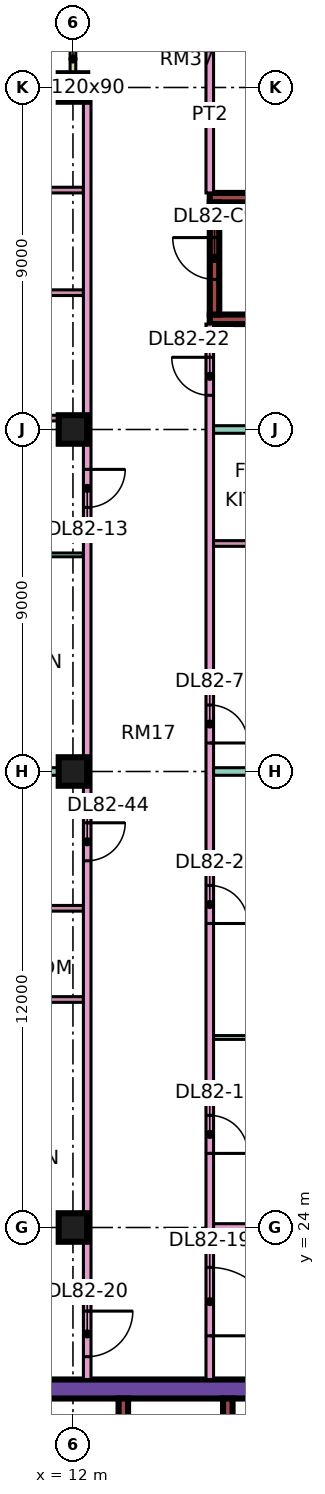
"""IFC4 building model, lengths in metres.
Left out: names, types, materials, properties, quantities, classifications, styles, units other than length and angle.
Written with IfcOpenShell. Run it as: python <this file> out.ifc"""

import sys

from ifc_helpers import new_model, si_unit, direction, frame, frame_2d, origin, origin_2d, place, context, subcontext, project, spatial, rectangle, extrude, element, fill, save


model = new_model("IFC4")
c1 = context("Model", 3, precision=1e-05, world=origin(), true_north=direction((0.0, 1.0)))
c2 = subcontext(c1, "Body", "Model", "MODEL_VIEW")
j1 = project(units=[si_unit("LENGTHUNIT", "METRE"), si_unit("PLANEANGLEUNIT", "RADIAN")], contexts=[c1])
p1 = place(None, origin())
s1 = spatial("IfcSite", under=j1, at=p1, CompositionType="ELEMENT")
p2 = place(p1, origin())
s2 = spatial("IfcBuilding", under=s1, at=p2, CompositionType="ELEMENT")
p3 = place(p2, frame((0.0, 0.0, 353.9)))
s3 = spatial("IfcBuildingStorey", under=s2, at=p3, CompositionType="ELEMENT", Elevation=353.9)
for number, where, z_axis, x_axis in (
    (1, (12.0, 24.0, 0.0), (0.0, 0.0, 1.0), (1.0, 0.0, 0.0)),
    (2, (12.0, 36.0, 0.0), (0.0, 0.0, 1.0), (1.0, 0.0, 0.0)),
    (3, (12.0, 45.0, 0.0), (0.0, 0.0, 1.0), (1.0, 0.0, 0.0)),
    (4, (12.0, 54.0, 0.0), (0.0, 0.0, 1.0), (1.0, 0.0, 0.0)),
):
    element("IfcColumn", number, at=place(p3, frame(where, z_axis=z_axis, x_axis=x_axis)), inside=s3, PredefinedType="COLUMN", context=c2, shape_type="SweptSolid", body=[
        extrude(rectangle(XDim=0.75, YDim=0.75, at=origin_2d()), origin(), (0.0, 0.0, 1.0), 3.75),
    ])
p4 = place(p3, frame((9.0, 19.75, 0.0), z_axis=(0.0, 0.0, 1.0), x_axis=(1.0, 0.0, 0.0)))
e5 = element("IfcWall", 5, at=p4, inside=s3, PredefinedType="SHEAR", context=c2, shape_type="SweptSolid", body=[
    extrude(rectangle(XDim=25.0, YDim=0.5, at=frame_2d((12.5, 0.0))), origin(), (0.0, 0.0, 1.0), 3.75),
])
p5 = place(p4, frame((19.1, 0.0, 0.0)))
e6 = element("IfcOpeningElement", 6, at=p5, cuts=e5, PredefinedType="OPENING", context=c2, shape_type="SweptSolid", body=[
    extrude(rectangle(XDim=1.8, YDim=2.4, at=frame_2d((0.9, 1.2))), frame((0.0, 0.26, 0.0), z_axis=(0.0, -1.0, 0.0), x_axis=(1.0, 0.0, 0.0)), (0.0, 0.0, 1.0), 0.52),
])
p6 = place(p3, frame((13.325, 7.5, 0.0), z_axis=(0.0, 0.0, 1.0), x_axis=(0.0, 1.0, 0.0)))
e7 = element("IfcWall", 7, at=p6, inside=s3, PredefinedType="SHEAR", context=c2, shape_type="SweptSolid", body=[
    extrude(rectangle(XDim=12.0, YDim=0.25, at=frame_2d((6.0, 0.0))), origin(), (0.0, 0.0, 1.0), 3.75),
])
p7 = place(p3, frame((16.075, 15.8, 0.0), z_axis=(0.0, 0.0, 1.0), x_axis=(0.0, 1.0, 0.0)))
e8 = element("IfcWall", 8, at=p7, inside=s3, PredefinedType="SHEAR", context=c2, shape_type="SweptSolid", body=[
    extrude(rectangle(XDim=3.7, YDim=0.25, at=frame_2d((1.85, 0.0))), origin(), (0.0, 0.0, 1.0), 3.75),
])
for number, where, z_axis, x_axis in (
    (9, (15.6, 47.9, 0.0), (0.0, 0.0, 1.0), (1.0, 0.0, 0.0)),
    (10, (15.6, 51.1, 0.0), (0.0, 0.0, 1.0), (1.0, 0.0, 0.0)),
):
    element("IfcWall", number, at=place(p3, frame(where, z_axis=z_axis, x_axis=x_axis)), inside=s3, PredefinedType="SHEAR", context=c2, shape_type="SweptSolid", body=[
        extrude(rectangle(XDim=7.0, YDim=0.25, at=frame_2d((3.5, 0.0))), origin(), (0.0, 0.0, 1.0), 3.75),
    ])
p8 = place(p3, frame((15.725, 48.025, 0.0), z_axis=(0.0, 0.0, 1.0), x_axis=(0.0, 1.0, 0.0)))
e11 = element("IfcWall", 11, at=p8, inside=s3, PredefinedType="SHEAR", context=c2, shape_type="SweptSolid", body=[
    extrude(rectangle(XDim=2.95, YDim=0.25, at=frame_2d((1.475, 0.0))), origin(), (0.0, 0.0, 1.0), 3.75),
])
p9 = place(p8, frame((0.925, 0.0, 0.0)))
e12 = element("IfcOpeningElement", 12, at=p9, cuts=e11, PredefinedType="OPENING", context=c2, shape_type="SweptSolid", body=[
    extrude(rectangle(XDim=1.1, YDim=2.2, at=frame_2d((0.55, 1.1))), frame((0.0, 0.135, 0.0), z_axis=(0.0, -1.0, 0.0), x_axis=(1.0, 0.0, 0.0)), (0.0, 0.0, 1.0), 0.27),
])
p10 = place(p3, frame((11.925, 54.0, 0.0), z_axis=(0.0, 0.0, 1.0), x_axis=(-1.0, 0.0, 0.0)))
e13 = element("IfcWall", 13, at=p10, inside=s3, PredefinedType="SOLIDWALL", context=c2, shape_type="SweptSolid", body=[
    extrude(rectangle(XDim=10.35, YDim=0.15, at=frame_2d((5.175, 0.0))), origin(), (0.0, 0.0, 1.0), 3.35),
])
p11 = place(p10, frame((2.075, 0.0, 1.7)))
e14 = element("IfcOpeningElement", 14, at=p11, cuts=e13, PredefinedType="OPENING", context=c2, shape_type="SweptSolid", body=[
    extrude(rectangle(XDim=1.2, YDim=0.9, at=frame_2d((0.6, 0.45))), frame((0.0, 0.085, 0.0), z_axis=(0.0, -1.0, 0.0), x_axis=(1.0, 0.0, 0.0)), (0.0, 0.0, 1.0), 0.17),
])
p12 = place(p10, frame((7.35, 0.0, 0.0)))
e15 = element("IfcOpeningElement", 15, at=p12, cuts=e13, PredefinedType="OPENING", context=c2, shape_type="SweptSolid", body=[
    extrude(rectangle(XDim=1.8, YDim=2.4, at=frame_2d((0.9, 1.2))), frame((0.0, 0.085, 0.0), z_axis=(0.0, -1.0, 0.0), x_axis=(1.0, 0.0, 0.0)), (0.0, 0.0, 1.0), 0.17),
])
p13 = place(p3, frame((12.0, 55.5, 0.0), z_axis=(0.0, 0.0, 1.0), x_axis=(0.0, -1.0, 0.0)))
e16 = element("IfcWall", 16, at=p13, inside=s3, PredefinedType="SOLIDWALL", context=c2, shape_type="SweptSolid", body=[
    extrude(rectangle(XDim=1.5, YDim=0.15, at=frame_2d((0.75, 0.0))), origin(), (0.0, 0.0, 1.0), 3.35),
])
p14 = place(p3, frame((-1.35, 22.4, 0.0), z_axis=(0.0, 0.0, 1.0), x_axis=(1.0, 0.0, 0.0)))
e17 = element("IfcWall", 17, at=p14, inside=s3, PredefinedType="PARTITIONING", context=c2, shape_type="SweptSolid", body=[
    extrude(rectangle(XDim=13.625, YDim=0.2, at=frame_2d((6.812, 0.0))), origin(), (0.0, 0.0, 1.0), 3.35),
])
p15 = place(p3, frame((0.0, 36.0, 0.0), z_axis=(0.0, 0.0, 1.0), x_axis=(1.0, 0.0, 0.0)))
e18 = element("IfcWall", 18, at=p15, inside=s3, PredefinedType="PARTITIONING", context=c2, shape_type="SweptSolid", body=[
    extrude(rectangle(XDim=12.275, YDim=0.2, at=frame_2d((6.137, 0.0))), origin(), (0.0, 0.0, 1.0), 3.35),
])
p16 = place(p3, frame((7.025, 41.7, 0.0), z_axis=(0.0, 0.0, 1.0), x_axis=(1.0, 0.0, 0.0)))
e19 = element("IfcWall", 19, at=p16, inside=s3, PredefinedType="PARTITIONING", context=c2, shape_type="SweptSolid", body=[
    extrude(rectangle(XDim=5.25, YDim=0.1, at=frame_2d((2.625, 0.0))), origin(), (0.0, 0.0, 1.0), 3.35),
])
p17 = place(p16, frame((2.2, 0.0, 0.0)))
e20 = element("IfcOpeningElement", 20, at=p17, cuts=e19, PredefinedType="OPENING", context=c2, shape_type="SweptSolid", body=[
    extrude(rectangle(XDim=0.9, YDim=2.1, at=frame_2d((0.45, 1.05))), frame((0.0, 0.06, 0.0), z_axis=(0.0, -1.0, 0.0), x_axis=(1.0, 0.0, 0.0)), (0.0, 0.0, 1.0), 0.12),
])
p18 = place(p3, frame((7.05, 45.3, 0.0), z_axis=(0.0, 0.0, 1.0), x_axis=(1.0, 0.0, 0.0)))
e21 = element("IfcWall", 21, at=p18, inside=s3, PredefinedType="PARTITIONING", context=c2, shape_type="SweptSolid", body=[
    extrude(rectangle(XDim=5.225, YDim=0.15, at=frame_2d((2.612, 0.0))), origin(), (0.0, 0.0, 1.0), 3.35),
])
p19 = place(p18, frame((2.275, 0.0, 0.0)))
e22 = element("IfcOpeningElement", 22, at=p19, cuts=e21, PredefinedType="OPENING", context=c2, shape_type="SweptSolid", body=[
    extrude(rectangle(XDim=0.8, YDim=2.1, at=frame_2d((0.4, 1.05))), frame((0.0, 0.085, 0.0), z_axis=(0.0, -1.0, 0.0), x_axis=(1.0, 0.0, 0.0)), (0.0, 0.0, 1.0), 0.17),
])
for number, where, z_axis, x_axis in (
    (23, (7.05, 48.6, 0.0), (0.0, 0.0, 1.0), (1.0, 0.0, 0.0)),
    (24, (7.05, 51.3, 0.0), (0.0, 0.0, 1.0), (1.0, 0.0, 0.0)),
):
    element("IfcWall", number, at=place(p3, frame(where, z_axis=z_axis, x_axis=x_axis)), inside=s3, PredefinedType="PARTITIONING", context=c2, shape_type="SweptSolid", body=[
        extrude(rectangle(XDim=5.225, YDim=0.15, at=frame_2d((2.612, 0.0))), origin(), (0.0, 0.0, 1.0), 3.35),
    ])
for number, where, z_axis, x_axis in (
    (25, (8.25, 30.0, 0.0), (0.0, 0.0, 1.0), (1.0, 0.0, 0.0)),
    (26, (8.25, 32.4, 0.0), (0.0, 0.0, 1.0), (1.0, 0.0, 0.0)),
):
    element("IfcWall", number, at=place(p3, frame(where, z_axis=z_axis, x_axis=x_axis)), inside=s3, PredefinedType="PARTITIONING", context=c2, shape_type="SweptSolid", body=[
        extrude(rectangle(XDim=4.025, YDim=0.15, at=frame_2d((2.012, 0.0))), origin(), (0.0, 0.0, 1.0), 3.35),
    ])
p20 = place(p3, frame((12.375, 20.0, 0.0), z_axis=(0.0, 0.0, 1.0), x_axis=(0.0, 1.0, 0.0)))
e27 = element("IfcWall", 27, at=p20, inside=s3, PredefinedType="PARTITIONING", context=c2, shape_type="SweptSolid", body=[
    extrude(rectangle(XDim=34.0, YDim=0.2, at=frame_2d((17.0, 0.0))), origin(), (0.0, 0.0, 1.0), 3.35),
])
p21 = place(p20, frame((22.95, 0.0, 0.0)))
e28 = element("IfcOpeningElement", 28, at=p21, cuts=e27, PredefinedType="OPENING", context=c2, shape_type="SweptSolid", body=[
    extrude(rectangle(XDim=1.0, YDim=2.1, at=frame_2d((0.5, 1.05))), frame((0.0, 0.11, 0.0), z_axis=(0.0, -1.0, 0.0), x_axis=(1.0, 0.0, 0.0)), (0.0, 0.0, 1.0), 0.22),
])
p22 = place(p20, frame((0.6, 0.0, 0.0)))
e29 = element("IfcOpeningElement", 29, at=p22, cuts=e27, PredefinedType="OPENING", context=c2, shape_type="SweptSolid", body=[
    extrude(rectangle(XDim=1.2, YDim=2.1, at=frame_2d((0.6, 1.05))), frame((0.0, 0.11, 0.0), z_axis=(0.0, -1.0, 0.0), x_axis=(1.0, 0.0, 0.0)), (0.0, 0.0, 1.0), 0.22),
])
p23 = place(p20, frame((13.65, 0.0, 0.0)))
e30 = element("IfcOpeningElement", 30, at=p23, cuts=e27, PredefinedType="OPENING", context=c2, shape_type="SweptSolid", body=[
    extrude(rectangle(XDim=1.0, YDim=2.1, at=frame_2d((0.5, 1.05))), frame((0.0, 0.11, 0.0), z_axis=(0.0, -1.0, 0.0), x_axis=(1.0, 0.0, 0.0)), (0.0, 0.0, 1.0), 0.22),
])
p24 = place(p3, frame((15.6, 20.0, 0.0), z_axis=(0.0, 0.0, 1.0), x_axis=(0.0, 1.0, 0.0)))
e31 = element("IfcWall", 31, at=p24, inside=s3, PredefinedType="PARTITIONING", context=c2, shape_type="SweptSolid", body=[
    extrude(rectangle(XDim=27.775, YDim=0.2, at=frame_2d((13.887, 0.0))), origin(), (0.0, 0.0, 1.0), 3.35),
])
p25 = place(p24, frame((5.95, 0.0, 0.0)))
e32 = element("IfcOpeningElement", 32, at=p25, cuts=e31, PredefinedType="OPENING", context=c2, shape_type="SweptSolid", body=[
    extrude(rectangle(XDim=1.0, YDim=2.1, at=frame_2d((0.5, 1.05))), frame((0.0, 0.11, 0.0), z_axis=(0.0, -1.0, 0.0), x_axis=(1.0, 0.0, 0.0)), (0.0, 0.0, 1.0), 0.22),
])
p26 = place(p24, frame((12.0, 0.0, 0.0)))
e33 = element("IfcOpeningElement", 33, at=p26, cuts=e31, PredefinedType="OPENING", context=c2, shape_type="SweptSolid", body=[
    extrude(rectangle(XDim=1.0, YDim=2.1, at=frame_2d((0.5, 1.05))), frame((0.0, 0.11, 0.0), z_axis=(0.0, -1.0, 0.0), x_axis=(1.0, 0.0, 0.0)), (0.0, 0.0, 1.0), 0.22),
])
p27 = place(p24, frame((16.75, 0.0, 0.0)))
e34 = element("IfcOpeningElement", 34, at=p27, cuts=e31, PredefinedType="OPENING", context=c2, shape_type="SweptSolid", body=[
    extrude(rectangle(XDim=1.0, YDim=2.1, at=frame_2d((0.5, 1.05))), frame((0.0, 0.11, 0.0), z_axis=(0.0, -1.0, 0.0), x_axis=(1.0, 0.0, 0.0)), (0.0, 0.0, 1.0), 0.22),
])
p28 = place(p24, frame((1.15, 0.0, 0.0)))
e35 = element("IfcOpeningElement", 35, at=p28, cuts=e31, PredefinedType="OPENING", context=c2, shape_type="SweptSolid", body=[
    extrude(rectangle(XDim=1.8, YDim=2.1, at=frame_2d((0.9, 1.05))), frame((0.0, 0.11, 0.0), z_axis=(0.0, -1.0, 0.0), x_axis=(1.0, 0.0, 0.0)), (0.0, 0.0, 1.0), 0.22),
])
p29 = place(p24, frame((25.9, 0.0, 0.0)))
e36 = element("IfcOpeningElement", 36, at=p29, cuts=e31, PredefinedType="OPENING", context=c2, shape_type="SweptSolid", body=[
    extrude(rectangle(XDim=1.0, YDim=2.1, at=frame_2d((0.5, 1.05))), frame((0.0, 0.11, 0.0), z_axis=(0.0, -1.0, 0.0), x_axis=(1.0, 0.0, 0.0)), (0.0, 0.0, 1.0), 0.22),
])
p30 = place(p3, frame((15.6, 51.225, 0.0), z_axis=(0.0, 0.0, 1.0), x_axis=(0.0, 1.0, 0.0)))
e37 = element("IfcWall", 37, at=p30, inside=s3, PredefinedType="PARTITIONING", context=c2, shape_type="SweptSolid", body=[
    extrude(rectangle(XDim=4.125, YDim=0.2, at=frame_2d((2.062, 0.0))), origin(), (0.0, 0.0, 1.0), 3.35),
])
p31 = place(p3, frame((15.7, 24.0, 0.0), z_axis=(0.0, 0.0, 1.0), x_axis=(1.0, 0.0, 0.0)))
e38 = element("IfcWall", 38, at=p31, inside=s3, PredefinedType="PARTITIONING", context=c2, shape_type="SweptSolid", body=[
    extrude(rectangle(XDim=5.8, YDim=0.2, at=frame_2d((2.9, 0.0))), origin(), (0.0, 0.0, 1.0), 3.35),
])
p32 = place(p3, frame((15.7, 29.0, 0.0), z_axis=(0.0, 0.0, 1.0), x_axis=(1.0, 0.0, 0.0)))
e39 = element("IfcWall", 39, at=p32, inside=s3, PredefinedType="PARTITIONING", context=c2, shape_type="SweptSolid", body=[
    extrude(rectangle(XDim=5.8, YDim=0.1, at=frame_2d((2.9, 0.0))), origin(), (0.0, 0.0, 1.0), 3.35),
])
p33 = place(p3, frame((15.7, 36.0, 0.0), z_axis=(0.0, 0.0, 1.0), x_axis=(1.0, 0.0, 0.0)))
e40 = element("IfcWall", 40, at=p33, inside=s3, PredefinedType="PARTITIONING", context=c2, shape_type="SweptSolid", body=[
    extrude(rectangle(XDim=8.3, YDim=0.2, at=frame_2d((4.15, 0.0))), origin(), (0.0, 0.0, 1.0), 3.35),
])
for number, where, z_axis, x_axis in (
    (41, (15.7, 38.4, 0.0), (0.0, 0.0, 1.0), (1.0, 0.0, 0.0)),
    (42, (15.7, 42.0, 0.0), (0.0, 0.0, 1.0), (1.0, 0.0, 0.0)),
):
    element("IfcWall", number, at=place(p3, frame(where, z_axis=z_axis, x_axis=x_axis)), inside=s3, PredefinedType="PARTITIONING", context=c2, shape_type="SweptSolid", body=[
        extrude(rectangle(XDim=2.825, YDim=0.15, at=frame_2d((1.413, 0.0))), origin(), (0.0, 0.0, 1.0), 3.35),
    ])
p34 = place(p3, frame((15.7, 45.0, 0.0), z_axis=(0.0, 0.0, 1.0), x_axis=(1.0, 0.0, 0.0)))
e43 = element("IfcWall", 43, at=p34, inside=s3, PredefinedType="PARTITIONING", context=c2, shape_type="SweptSolid", body=[
    extrude(rectangle(XDim=8.3, YDim=0.2, at=frame_2d((4.15, 0.0))), origin(), (0.0, 0.0, 1.0), 3.35),
])
p35 = place(p9, frame((1.1, 0.0, 0.0), z_axis=(0.0, 0.0, 1.0), x_axis=(-1.0, 0.0, 0.0)))
e44 = element("IfcDoor", 44, at=p35, inside=s3, OperationType="SINGLE_SWING_RIGHT", PredefinedType="DOOR", context=c2, shape_type="SweptSolid", body=[
    extrude(rectangle(XDim=1.1, YDim=2.2, at=frame_2d((0.55, 1.1))), frame((0.0, 0.025, 0.0), z_axis=(0.0, -1.0, 0.0), x_axis=(1.0, 0.0, 0.0)), (0.0, 0.0, 1.0), 0.05),
])
fill(e12, e44)
p36 = place(p25, frame((1.0, 0.0, 0.0), z_axis=(0.0, 0.0, 1.0), x_axis=(-1.0, 0.0, 0.0)))
e45 = element("IfcDoor", 45, at=p36, inside=s3, OperationType="SINGLE_SWING_LEFT", PredefinedType="DOOR", context=c2, shape_type="SweptSolid", body=[
    extrude(rectangle(XDim=1.0, YDim=2.1, at=frame_2d((0.5, 1.05))), frame((0.0, 0.025, 0.0), z_axis=(0.0, -1.0, 0.0), x_axis=(1.0, 0.0, 0.0)), (0.0, 0.0, 1.0), 0.05),
])
fill(e32, e45)
p37 = place(p26, frame((1.0, 0.0, 0.0), z_axis=(0.0, 0.0, 1.0), x_axis=(-1.0, 0.0, 0.0)))
e46 = element("IfcDoor", 46, at=p37, inside=s3, OperationType="SINGLE_SWING_LEFT", PredefinedType="DOOR", context=c2, shape_type="SweptSolid", body=[
    extrude(rectangle(XDim=1.0, YDim=2.1, at=frame_2d((0.5, 1.05))), frame((0.0, 0.025, 0.0), z_axis=(0.0, -1.0, 0.0), x_axis=(1.0, 0.0, 0.0)), (0.0, 0.0, 1.0), 0.05),
])
fill(e33, e46)
p38 = place(p27, frame((1.0, 0.0, 0.0), z_axis=(0.0, 0.0, 1.0), x_axis=(-1.0, 0.0, 0.0)))
e47 = element("IfcDoor", 47, at=p38, inside=s3, OperationType="SINGLE_SWING_LEFT", PredefinedType="DOOR", context=c2, shape_type="SweptSolid", body=[
    extrude(rectangle(XDim=1.0, YDim=2.1, at=frame_2d((0.5, 1.05))), frame((0.0, 0.025, 0.0), z_axis=(0.0, -1.0, 0.0), x_axis=(1.0, 0.0, 0.0)), (0.0, 0.0, 1.0), 0.05),
])
fill(e34, e47)
p39 = place(p21, origin())
e48 = element("IfcDoor", 48, at=p39, inside=s3, OperationType="SINGLE_SWING_RIGHT", PredefinedType="DOOR", context=c2, shape_type="SweptSolid", body=[
    extrude(rectangle(XDim=1.0, YDim=2.1, at=frame_2d((0.5, 1.05))), frame((0.0, 0.025, 0.0), z_axis=(0.0, -1.0, 0.0), x_axis=(1.0, 0.0, 0.0)), (0.0, 0.0, 1.0), 0.05),
])
fill(e28, e48)
p40 = place(p28, frame((1.8, 0.0, 0.0), z_axis=(0.0, 0.0, 1.0), x_axis=(-1.0, 0.0, 0.0)))
e49 = element("IfcDoor", 49, at=p40, inside=s3, OperationType="DOUBLE_DOOR_SINGLE_SWING", PredefinedType="DOOR", context=c2, shape_type="SweptSolid", body=[
    extrude(rectangle(XDim=1.8, YDim=2.1, at=frame_2d((0.9, 1.05))), frame((0.0, 0.025, 0.0), z_axis=(0.0, -1.0, 0.0), x_axis=(1.0, 0.0, 0.0)), (0.0, 0.0, 1.0), 0.05),
])
fill(e35, e49)
p41 = place(p22, origin())
e50 = element("IfcDoor", 50, at=p41, inside=s3, OperationType="SINGLE_SWING_RIGHT", PredefinedType="DOOR", context=c2, shape_type="SweptSolid", body=[
    extrude(rectangle(XDim=1.2, YDim=2.1, at=frame_2d((0.6, 1.05))), frame((0.0, 0.025, 0.0), z_axis=(0.0, -1.0, 0.0), x_axis=(1.0, 0.0, 0.0)), (0.0, 0.0, 1.0), 0.05),
])
fill(e29, e50)
p42 = place(p29, frame((1.0, 0.0, 0.0), z_axis=(0.0, 0.0, 1.0), x_axis=(-1.0, 0.0, 0.0)))
e51 = element("IfcDoor", 51, at=p42, inside=s3, OperationType="SINGLE_SWING_RIGHT", PredefinedType="DOOR", context=c2, shape_type="SweptSolid", body=[
    extrude(rectangle(XDim=1.0, YDim=2.1, at=frame_2d((0.5, 1.05))), frame((0.0, 0.025, 0.0), z_axis=(0.0, -1.0, 0.0), x_axis=(1.0, 0.0, 0.0)), (0.0, 0.0, 1.0), 0.05),
])
fill(e36, e51)
p43 = place(p23, origin())
e52 = element("IfcDoor", 52, at=p43, inside=s3, OperationType="SINGLE_SWING_RIGHT", PredefinedType="DOOR", context=c2, shape_type="SweptSolid", body=[
    extrude(rectangle(XDim=1.0, YDim=2.1, at=frame_2d((0.5, 1.05))), frame((0.0, 0.025, 0.0), z_axis=(0.0, -1.0, 0.0), x_axis=(1.0, 0.0, 0.0)), (0.0, 0.0, 1.0), 0.05),
])
fill(e30, e52)
save(model, sys.argv[1])
